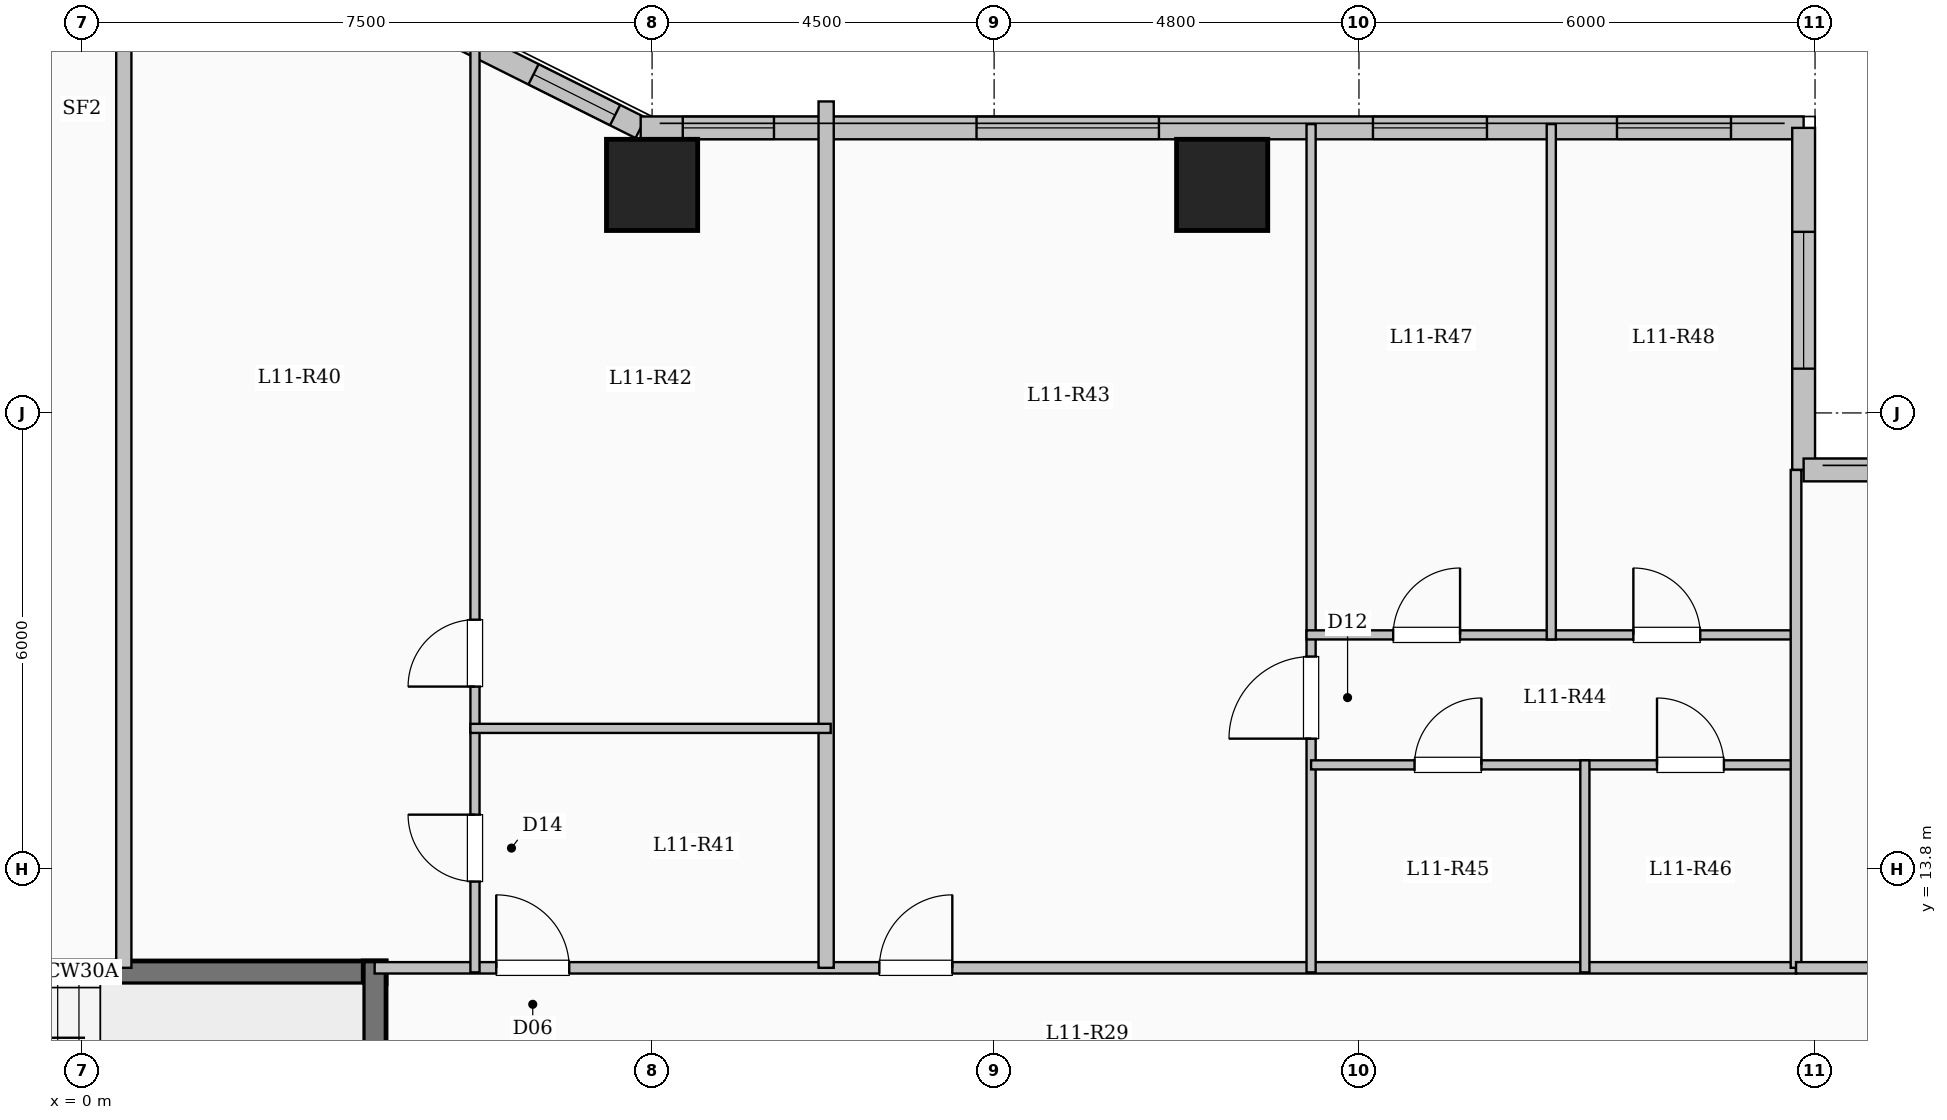
"""IFC4 building model, lengths in metres.
Left out: names, types, materials, properties, quantities, classifications, styles, units other than length and angle.
Written with IfcOpenShell. Run it as: python <this file> out.ifc"""

import sys

from ifc_helpers import new_model, si_unit, direction, frame, frame_2d, origin, origin_2d, place, context, subcontext, project, spatial, rectangle, extrude, element, fill, save


model = new_model("IFC4")
c1 = context("Model", 3, precision=1e-05, world=origin(), true_north=direction((0.0, 1.0)))
c2 = subcontext(c1, "Body", "Model", "MODEL_VIEW")
j1 = project(units=[si_unit("LENGTHUNIT", "METRE"), si_unit("PLANEANGLEUNIT", "RADIAN")], contexts=[c1])
p1 = place(None, origin())
s1 = spatial("IfcSite", under=j1, at=p1, CompositionType="ELEMENT")
p2 = place(p1, origin())
s2 = spatial("IfcBuilding", under=s1, at=p2, CompositionType="ELEMENT")
p3 = place(p2, frame((0.0, 0.0, 44.1)))
s3 = spatial("IfcBuildingStorey", under=s2, at=p3, CompositionType="ELEMENT", Elevation=44.1)
for number, where, z_axis, x_axis in (
    (1, (7.5, 22.8, 0.0), (0.0, 0.0, 1.0), (1.0, 0.0, 0.0)),
    (2, (15.0, 22.8, 0.0), (0.0, 0.0, 1.0), (1.0, 0.0, 0.0)),
):
    element("IfcColumn", number, at=place(p3, frame(where, z_axis=z_axis, x_axis=x_axis)), inside=s3, PredefinedType="COLUMN", context=c2, shape_type="SweptSolid", body=[
        extrude(rectangle(XDim=1.2, YDim=1.2, at=origin_2d()), origin(), (0.0, 0.0, 1.0), 3.35),
    ])
p4 = place(p3, frame((4.35, 25.05, 0.0), z_axis=(0.0, 0.0, 1.0), x_axis=(0.894427191, -0.4472135955, 0.0)))
e3 = element("IfcWall", 3, at=p4, inside=s3, PredefinedType="SOLIDWALL", context=c2, shape_type="SweptSolid", body=[
    extrude(rectangle(XDim=3.354, YDim=0.3, at=frame_2d((1.677, 0.0))), origin(), (0.0, 0.0, 1.0), 3.1),
])
p5 = place(p4, frame((1.778, 0.0, 0.95)))
e4 = element("IfcOpeningElement", 4, at=p5, cuts=e3, PredefinedType="OPENING", context=c2, shape_type="SweptSolid", body=[
    extrude(rectangle(XDim=1.2, YDim=1.5, at=frame_2d((0.6, 0.75))), frame((0.0, 0.16, 0.0), z_axis=(0.0, -1.0, 0.0), x_axis=(1.0, 0.0, 0.0)), (0.0, 0.0, 1.0), 0.32),
])
p6 = place(p3, frame((7.35, 23.55, 0.0), z_axis=(0.0, 0.0, 1.0), x_axis=(1.0, 0.0, 0.0)))
e5 = element("IfcWall", 5, at=p6, inside=s3, PredefinedType="SOLIDWALL", context=c2, shape_type="SweptSolid", body=[
    extrude(rectangle(XDim=15.3, YDim=0.3, at=frame_2d((7.65, 0.0))), origin(), (0.0, 0.0, 1.0), 3.1),
])
p7 = place(p6, frame((0.554, 0.0, 0.95)))
e6 = element("IfcOpeningElement", 6, at=p7, cuts=e5, PredefinedType="OPENING", context=c2, shape_type="SweptSolid", body=[
    extrude(rectangle(XDim=1.2, YDim=1.5, at=frame_2d((0.6, 0.75))), frame((0.0, 0.16, 0.0), z_axis=(0.0, -1.0, 0.0), x_axis=(1.0, 0.0, 0.0)), (0.0, 0.0, 1.0), 0.32),
])
p8 = place(p6, frame((4.418, 0.0, 0.9)))
e7 = element("IfcOpeningElement", 7, at=p8, cuts=e5, PredefinedType="OPENING", context=c2, shape_type="SweptSolid", body=[
    extrude(rectangle(XDim=2.4, YDim=1.8, at=frame_2d((1.2, 0.9))), frame((0.0, 0.16, 0.0), z_axis=(0.0, -1.0, 0.0), x_axis=(1.0, 0.0, 0.0)), (0.0, 0.0, 1.0), 0.32),
])
p9 = place(p6, frame((9.634, 0.0, 0.9)))
e8 = element("IfcOpeningElement", 8, at=p9, cuts=e5, PredefinedType="OPENING", context=c2, shape_type="SweptSolid", body=[
    extrude(rectangle(XDim=1.5, YDim=1.65, at=frame_2d((0.75, 0.825))), frame((0.0, 0.16, 0.0), z_axis=(0.0, -1.0, 0.0), x_axis=(1.0, 0.0, 0.0)), (0.0, 0.0, 1.0), 0.32),
])
p10 = place(p6, frame((12.844, 0.0, 0.9)))
e9 = element("IfcOpeningElement", 9, at=p10, cuts=e5, PredefinedType="OPENING", context=c2, shape_type="SweptSolid", body=[
    extrude(rectangle(XDim=1.5, YDim=1.65, at=frame_2d((0.75, 0.825))), frame((0.0, 0.16, 0.0), z_axis=(0.0, -1.0, 0.0), x_axis=(1.0, 0.0, 0.0)), (0.0, 0.0, 1.0), 0.32),
])
p11 = place(p3, frame((22.65, 23.55, 0.0), z_axis=(0.0, 0.0, 1.0), x_axis=(0.0, -1.0, 0.0)))
e10 = element("IfcWall", 10, at=p11, inside=s3, PredefinedType="SOLIDWALL", context=c2, shape_type="SweptSolid", body=[
    extrude(rectangle(XDim=4.5, YDim=0.3, at=frame_2d((2.25, 0.0))), origin(), (0.0, 0.0, 1.0), 3.1),
])
p12 = place(p11, frame((1.367, 0.0, 0.9)))
e11 = element("IfcOpeningElement", 11, at=p12, cuts=e10, PredefinedType="OPENING", context=c2, shape_type="SweptSolid", body=[
    extrude(rectangle(XDim=1.8, YDim=1.65, at=frame_2d((0.9, 0.825))), frame((0.0, 0.16, 0.0), z_axis=(0.0, -1.0, 0.0), x_axis=(1.0, 0.0, 0.0)), (0.0, 0.0, 1.0), 0.32),
])
p13 = place(p3, frame((22.65, 19.05, 0.0), z_axis=(0.0, 0.0, 1.0), x_axis=(1.0, 0.0, 0.0)))
e12 = element("IfcWall", 12, at=p13, inside=s3, PredefinedType="SOLIDWALL", context=c2, shape_type="SweptSolid", body=[
    extrude(rectangle(XDim=6.0, YDim=0.3, at=frame_2d((3.0, 0.0))), origin(), (0.0, 0.0, 1.0), 3.1),
])
p14 = place(p13, frame((1.975, 0.0, 0.9)))
e13 = element("IfcOpeningElement", 13, at=p14, cuts=e12, PredefinedType="OPENING", context=c2, shape_type="SweptSolid", body=[
    extrude(rectangle(XDim=2.0, YDim=1.7, at=frame_2d((1.0, 0.85))), frame((0.0, 0.16, 0.0), z_axis=(0.0, -1.0, 0.0), x_axis=(1.0, 0.0, 0.0)), (0.0, 0.0, 1.0), 0.32),
])
p15 = place(p3, frame((-4.0, 12.44, 0.0), z_axis=(0.0, 0.0, 1.0), x_axis=(1.0, 0.0, 0.0)))
e14 = element("IfcWall", 14, at=p15, inside=s3, PredefinedType="SHEAR", context=c2, shape_type="SweptSolid", body=[
    extrude(rectangle(XDim=8.0, YDim=0.3, at=frame_2d((4.0, 0.0))), origin(), (0.0, 0.0, 1.0), 3.35),
])
p16 = place(p3, frame((3.85, 9.0, 0.0), z_axis=(0.0, 0.0, 1.0), x_axis=(0.0, 1.0, 0.0)))
e15 = element("IfcWall", 15, at=p16, inside=s3, PredefinedType="SHEAR", context=c2, shape_type="SweptSolid", body=[
    extrude(rectangle(XDim=3.59, YDim=0.3, at=frame_2d((1.795, 0.0))), origin(), (0.0, 0.0, 1.0), 3.35),
])
p17 = place(p3, frame((3.85, 12.5, 0.0), z_axis=(0.0, 0.0, 1.0), x_axis=(1.0, 0.0, 0.0)))
e16 = element("IfcWall", 16, at=p17, inside=s3, PredefinedType="PARTITIONING", context=c2, shape_type="SweptSolid", body=[
    extrude(rectangle(XDim=18.7, YDim=0.15, at=frame_2d((9.35, 0.0))), origin(), (0.0, 0.0, 1.0), 3.1),
])
p18 = place(p17, frame((1.6, 0.0, 0.0)))
e17 = element("IfcOpeningElement", 17, at=p18, cuts=e16, PredefinedType="OPENING", context=c2, shape_type="SweptSolid", body=[
    extrude(rectangle(XDim=0.96, YDim=2.15, at=frame_2d((0.48, 1.075))), frame((0.0, 0.085, 0.0), z_axis=(0.0, -1.0, 0.0), x_axis=(1.0, 0.0, 0.0)), (0.0, 0.0, 1.0), 0.17),
])
p19 = place(p17, frame((6.64, 0.0, 0.0)))
e18 = element("IfcOpeningElement", 18, at=p19, cuts=e16, PredefinedType="OPENING", context=c2, shape_type="SweptSolid", body=[
    extrude(rectangle(XDim=0.96, YDim=2.15, at=frame_2d((0.48, 1.075))), frame((0.0, 0.085, 0.0), z_axis=(0.0, -1.0, 0.0), x_axis=(1.0, 0.0, 0.0)), (0.0, 0.0, 1.0), 0.17),
])
p20 = place(p3, frame((0.55, 12.5, 0.0), z_axis=(0.0, 0.0, 1.0), x_axis=(0.0, 1.0, 0.0)))
e19 = element("IfcWall", 19, at=p20, inside=s3, PredefinedType="SOLIDWALL", context=c2, shape_type="SweptSolid", body=[
    extrude(rectangle(XDim=12.58, YDim=0.2, at=frame_2d((6.29, 0.0))), origin(), (0.0, 0.0, 1.0), 3.1),
])
p21 = place(p3, frame((9.79, 12.5, 0.0), z_axis=(0.0, 0.0, 1.0), x_axis=(0.0, 1.0, 0.0)))
e20 = element("IfcWall", 20, at=p21, inside=s3, PredefinedType="SOLIDWALL", context=c2, shape_type="SweptSolid", body=[
    extrude(rectangle(XDim=11.398, YDim=0.2, at=frame_2d((5.699, 0.0))), origin(), (0.0, 0.0, 1.0), 3.1),
])
p22 = place(p3, frame((5.17, 12.44, 0.0), z_axis=(0.0, 0.0, 1.0), x_axis=(0.0, 1.0, 0.0)))
e21 = element("IfcWall", 21, at=p22, inside=s3, PredefinedType="PARTITIONING", context=c2, shape_type="SweptSolid", body=[
    extrude(rectangle(XDim=3.21, YDim=0.12, at=frame_2d((1.605, 0.0))), origin(), (0.0, 0.0, 1.0), 3.1),
])
p23 = place(p22, frame((1.195, 0.0, 0.0)))
e22 = element("IfcOpeningElement", 22, at=p23, cuts=e21, PredefinedType="OPENING", context=c2, shape_type="SweptSolid", body=[
    extrude(rectangle(XDim=0.88, YDim=2.1, at=frame_2d((0.44, 1.05))), frame((0.0, 0.07, 0.0), z_axis=(0.0, -1.0, 0.0), x_axis=(1.0, 0.0, 0.0)), (0.0, 0.0, 1.0), 0.14),
])
p24 = place(p3, frame((5.17, 15.65, 0.0), z_axis=(0.0, 0.0, 1.0), x_axis=(0.0, 1.0, 0.0)))
e23 = element("IfcWall", 23, at=p24, inside=s3, PredefinedType="PARTITIONING", context=c2, shape_type="SweptSolid", body=[
    extrude(rectangle(XDim=9.388, YDim=0.12, at=frame_2d((4.694, 0.0))), origin(), (0.0, 0.0, 1.0), 3.1),
])
p25 = place(p24, frame((0.55, 0.0, 0.0)))
e24 = element("IfcOpeningElement", 24, at=p25, cuts=e23, PredefinedType="OPENING", context=c2, shape_type="SweptSolid", body=[
    extrude(rectangle(XDim=0.88, YDim=2.1, at=frame_2d((0.44, 1.05))), frame((0.0, 0.07, 0.0), z_axis=(0.0, -1.0, 0.0), x_axis=(1.0, 0.0, 0.0)), (0.0, 0.0, 1.0), 0.14),
])
p26 = place(p3, frame((5.11, 15.65, 0.0), z_axis=(0.0, 0.0, 1.0), x_axis=(1.0, 0.0, 0.0)))
e25 = element("IfcWall", 25, at=p26, inside=s3, PredefinedType="PARTITIONING", context=c2, shape_type="SweptSolid", body=[
    extrude(rectangle(XDim=4.74, YDim=0.12, at=frame_2d((2.37, 0.0))), origin(), (0.0, 0.0, 1.0), 3.1),
])
p27 = place(p3, frame((16.17, 12.44, 0.0), z_axis=(0.0, 0.0, 1.0), x_axis=(0.0, 1.0, 0.0)))
e26 = element("IfcWall", 26, at=p27, inside=s3, PredefinedType="PARTITIONING", context=c2, shape_type="SweptSolid", body=[
    extrude(rectangle(XDim=11.16, YDim=0.12, at=frame_2d((5.58, 0.0))), origin(), (0.0, 0.0, 1.0), 3.1),
])
p28 = place(p27, frame((3.075, 0.0, 0.0)))
e27 = element("IfcOpeningElement", 27, at=p28, cuts=e26, PredefinedType="OPENING", context=c2, shape_type="SweptSolid", body=[
    extrude(rectangle(XDim=1.08, YDim=2.15, at=frame_2d((0.54, 1.075))), frame((0.0, 0.07, 0.0), z_axis=(0.0, -1.0, 0.0), x_axis=(1.0, 0.0, 0.0)), (0.0, 0.0, 1.0), 0.14),
])
p29 = place(p3, frame((16.17, 15.17, 0.0), z_axis=(0.0, 0.0, 1.0), x_axis=(1.0, 0.0, 0.0)))
e28 = element("IfcWall", 28, at=p29, inside=s3, PredefinedType="PARTITIONING", context=c2, shape_type="SweptSolid", body=[
    extrude(rectangle(XDim=3.602, YDim=0.12, at=frame_2d((1.801, 0.0))), origin(), (0.0, 0.0, 1.0), 3.1),
])
p30 = place(p29, frame((1.361, 0.0, 0.0)))
e29 = element("IfcOpeningElement", 29, at=p30, cuts=e28, PredefinedType="OPENING", context=c2, shape_type="SweptSolid", body=[
    extrude(rectangle(XDim=0.88, YDim=2.1, at=frame_2d((0.44, 1.05))), frame((0.0, 0.07, 0.0), z_axis=(0.0, -1.0, 0.0), x_axis=(1.0, 0.0, 0.0)), (0.0, 0.0, 1.0), 0.14),
])
p31 = place(p3, frame((19.772, 15.17, 0.0), z_axis=(0.0, 0.0, 1.0), x_axis=(1.0, 0.0, 0.0)))
e30 = element("IfcWall", 30, at=p31, inside=s3, PredefinedType="PARTITIONING", context=c2, shape_type="SweptSolid", body=[
    extrude(rectangle(XDim=2.778, YDim=0.12, at=frame_2d((1.389, 0.0))), origin(), (0.0, 0.0, 1.0), 3.1),
])
p32 = place(p31, frame((0.949, 0.0, 0.0)))
e31 = element("IfcOpeningElement", 31, at=p32, cuts=e30, PredefinedType="OPENING", context=c2, shape_type="SweptSolid", body=[
    extrude(rectangle(XDim=0.88, YDim=2.1, at=frame_2d((0.44, 1.05))), frame((0.0, 0.07, 0.0), z_axis=(0.0, -1.0, 0.0), x_axis=(1.0, 0.0, 0.0)), (0.0, 0.0, 1.0), 0.14),
])
p33 = place(p3, frame((16.11, 16.88, 0.0), z_axis=(0.0, 0.0, 1.0), x_axis=(1.0, 0.0, 0.0)))
e32 = element("IfcWall", 32, at=p33, inside=s3, PredefinedType="PARTITIONING", context=c2, shape_type="SweptSolid", body=[
    extrude(rectangle(XDim=6.5, YDim=0.12, at=frame_2d((3.25, 0.0))), origin(), (0.0, 0.0, 1.0), 3.1),
])
p34 = place(p33, frame((1.14, 0.0, 0.0)))
e33 = element("IfcOpeningElement", 33, at=p34, cuts=e32, PredefinedType="OPENING", context=c2, shape_type="SweptSolid", body=[
    extrude(rectangle(XDim=0.88, YDim=2.1, at=frame_2d((0.44, 1.05))), frame((0.0, 0.07, 0.0), z_axis=(0.0, -1.0, 0.0), x_axis=(1.0, 0.0, 0.0)), (0.0, 0.0, 1.0), 0.14),
])
p35 = place(p33, frame((4.3, 0.0, 0.0)))
e34 = element("IfcOpeningElement", 34, at=p35, cuts=e32, PredefinedType="OPENING", context=c2, shape_type="SweptSolid", body=[
    extrude(rectangle(XDim=0.88, YDim=2.1, at=frame_2d((0.44, 1.05))), frame((0.0, 0.07, 0.0), z_axis=(0.0, -1.0, 0.0), x_axis=(1.0, 0.0, 0.0)), (0.0, 0.0, 1.0), 0.14),
])
p36 = place(p3, frame((19.772, 12.44, 0.0), z_axis=(0.0, 0.0, 1.0), x_axis=(0.0, 1.0, 0.0)))
e35 = element("IfcWall", 35, at=p36, inside=s3, PredefinedType="PARTITIONING", context=c2, shape_type="SweptSolid", body=[
    extrude(rectangle(XDim=2.79, YDim=0.12, at=frame_2d((1.395, 0.0))), origin(), (0.0, 0.0, 1.0), 3.1),
])
p37 = place(p3, frame((19.33, 16.82, 0.0), z_axis=(0.0, 0.0, 1.0), x_axis=(0.0, 1.0, 0.0)))
e36 = element("IfcWall", 36, at=p37, inside=s3, PredefinedType="PARTITIONING", context=c2, shape_type="SweptSolid", body=[
    extrude(rectangle(XDim=6.78, YDim=0.12, at=frame_2d((3.39, 0.0))), origin(), (0.0, 0.0, 1.0), 3.1),
])
p38 = place(p3, frame((22.55, 12.5, 0.0), z_axis=(0.0, 0.0, 1.0), x_axis=(0.0, 1.0, 0.0)))
e37 = element("IfcWall", 37, at=p38, inside=s3, PredefinedType="PARTITIONING", context=c2, shape_type="SweptSolid", body=[
    extrude(rectangle(XDim=6.55, YDim=0.14, at=frame_2d((3.275, 0.0))), origin(), (0.0, 0.0, 1.0), 3.1),
])
p39 = place(p3, frame((22.55, 12.5, 0.0), z_axis=(0.0, 0.0, 1.0), x_axis=(1.0, 0.0, 0.0)))
e38 = element("IfcWall", 38, at=p39, inside=s3, PredefinedType="PARTITIONING", context=c2, shape_type="SweptSolid", body=[
    extrude(rectangle(XDim=6.13, YDim=0.15, at=frame_2d((3.065, 0.0))), origin(), (0.0, 0.0, 1.0), 3.1),
])
p40 = place(p39, frame((2.59, 0.0, 0.0)))
e39 = element("IfcOpeningElement", 39, at=p40, cuts=e38, PredefinedType="OPENING", context=c2, shape_type="SweptSolid", body=[
    extrude(rectangle(XDim=0.95, YDim=2.15, at=frame_2d((0.475, 1.075))), frame((0.0, 0.085, 0.0), z_axis=(0.0, -1.0, 0.0), x_axis=(1.0, 0.0, 0.0)), (0.0, 0.0, 1.0), 0.17),
])
p41 = place(p5, origin())
e40 = element("IfcWindow", 40, at=p41, inside=s3, PartitioningType="SINGLE_PANEL", PredefinedType="WINDOW", context=c2, shape_type="SweptSolid", body=[
    extrude(rectangle(XDim=1.2, YDim=1.5, at=frame_2d((0.6, 0.75))), frame((0.0, 0.03, 0.0), z_axis=(0.0, -1.0, 0.0), x_axis=(1.0, 0.0, 0.0)), (0.0, 0.0, 1.0), 0.06),
])
fill(e4, e40)
p42 = place(p7, origin())
e41 = element("IfcWindow", 41, at=p42, inside=s3, PartitioningType="SINGLE_PANEL", PredefinedType="WINDOW", context=c2, shape_type="SweptSolid", body=[
    extrude(rectangle(XDim=1.2, YDim=1.5, at=frame_2d((0.6, 0.75))), frame((0.0, 0.03, 0.0), z_axis=(0.0, -1.0, 0.0), x_axis=(1.0, 0.0, 0.0)), (0.0, 0.0, 1.0), 0.06),
])
fill(e6, e41)
p43 = place(p8, origin())
e42 = element("IfcWindow", 42, at=p43, inside=s3, PartitioningType="SINGLE_PANEL", PredefinedType="WINDOW", context=c2, shape_type="SweptSolid", body=[
    extrude(rectangle(XDim=2.4, YDim=1.8, at=frame_2d((1.2, 0.9))), frame((0.0, 0.03, 0.0), z_axis=(0.0, -1.0, 0.0), x_axis=(1.0, 0.0, 0.0)), (0.0, 0.0, 1.0), 0.06),
])
fill(e7, e42)
p44 = place(p9, origin())
e43 = element("IfcWindow", 43, at=p44, inside=s3, PartitioningType="SINGLE_PANEL", PredefinedType="WINDOW", context=c2, shape_type="SweptSolid", body=[
    extrude(rectangle(XDim=1.5, YDim=1.65, at=frame_2d((0.75, 0.825))), frame((0.0, 0.03, 0.0), z_axis=(0.0, -1.0, 0.0), x_axis=(1.0, 0.0, 0.0)), (0.0, 0.0, 1.0), 0.06),
])
fill(e8, e43)
p45 = place(p10, origin())
e44 = element("IfcWindow", 44, at=p45, inside=s3, PartitioningType="SINGLE_PANEL", PredefinedType="WINDOW", context=c2, shape_type="SweptSolid", body=[
    extrude(rectangle(XDim=1.5, YDim=1.65, at=frame_2d((0.75, 0.825))), frame((0.0, 0.03, 0.0), z_axis=(0.0, -1.0, 0.0), x_axis=(1.0, 0.0, 0.0)), (0.0, 0.0, 1.0), 0.06),
])
fill(e9, e44)
p46 = place(p12, origin())
e45 = element("IfcWindow", 45, at=p46, inside=s3, PartitioningType="SINGLE_PANEL", PredefinedType="WINDOW", context=c2, shape_type="SweptSolid", body=[
    extrude(rectangle(XDim=1.8, YDim=1.65, at=frame_2d((0.9, 0.825))), frame((0.0, 0.03, 0.0), z_axis=(0.0, -1.0, 0.0), x_axis=(1.0, 0.0, 0.0)), (0.0, 0.0, 1.0), 0.06),
])
fill(e11, e45)
p47 = place(p18, origin())
e46 = element("IfcDoor", 46, at=p47, inside=s3, OperationType="SINGLE_SWING_LEFT", PredefinedType="DOOR", context=c2, shape_type="SweptSolid", body=[
    extrude(rectangle(XDim=0.96, YDim=2.15, at=frame_2d((0.48, 1.075))), frame((0.0, 0.025, 0.0), z_axis=(0.0, -1.0, 0.0), x_axis=(1.0, 0.0, 0.0)), (0.0, 0.0, 1.0), 0.05),
])
fill(e17, e46)
p48 = place(p23, origin())
e47 = element("IfcDoor", 47, at=p48, inside=s3, OperationType="SINGLE_SWING_RIGHT", PredefinedType="DOOR", context=c2, shape_type="SweptSolid", body=[
    extrude(rectangle(XDim=0.88, YDim=2.1, at=frame_2d((0.44, 1.05))), frame((0.0, 0.025, 0.0), z_axis=(0.0, -1.0, 0.0), x_axis=(1.0, 0.0, 0.0)), (0.0, 0.0, 1.0), 0.05),
])
fill(e22, e47)
p49 = place(p25, origin())
e48 = element("IfcDoor", 48, at=p49, inside=s3, OperationType="SINGLE_SWING_LEFT", PredefinedType="DOOR", context=c2, shape_type="SweptSolid", body=[
    extrude(rectangle(XDim=0.88, YDim=2.1, at=frame_2d((0.44, 1.05))), frame((0.0, 0.025, 0.0), z_axis=(0.0, -1.0, 0.0), x_axis=(1.0, 0.0, 0.0)), (0.0, 0.0, 1.0), 0.05),
])
fill(e24, e48)
p50 = place(p19, origin())
e49 = element("IfcDoor", 49, at=p50, inside=s3, OperationType="SINGLE_SWING_RIGHT", PredefinedType="DOOR", context=c2, shape_type="SweptSolid", body=[
    extrude(rectangle(XDim=0.96, YDim=2.15, at=frame_2d((0.48, 1.075))), frame((0.0, 0.025, 0.0), z_axis=(0.0, -1.0, 0.0), x_axis=(1.0, 0.0, 0.0)), (0.0, 0.0, 1.0), 0.05),
])
fill(e18, e49)
p51 = place(p28, origin())
e50 = element("IfcDoor", 50, at=p51, inside=s3, OperationType="SINGLE_SWING_LEFT", PredefinedType="DOOR", context=c2, shape_type="SweptSolid", body=[
    extrude(rectangle(XDim=1.08, YDim=2.15, at=frame_2d((0.54, 1.075))), frame((0.0, 0.025, 0.0), z_axis=(0.0, -1.0, 0.0), x_axis=(1.0, 0.0, 0.0)), (0.0, 0.0, 1.0), 0.05),
])
fill(e27, e50)
p52 = place(p30, origin())
e51 = element("IfcDoor", 51, at=p52, inside=s3, OperationType="SINGLE_SWING_RIGHT", PredefinedType="DOOR", context=c2, shape_type="SweptSolid", body=[
    extrude(rectangle(XDim=0.88, YDim=2.1, at=frame_2d((0.44, 1.05))), frame((0.0, 0.025, 0.0), z_axis=(0.0, -1.0, 0.0), x_axis=(1.0, 0.0, 0.0)), (0.0, 0.0, 1.0), 0.05),
])
fill(e29, e51)
p53 = place(p32, origin())
e52 = element("IfcDoor", 52, at=p53, inside=s3, OperationType="SINGLE_SWING_LEFT", PredefinedType="DOOR", context=c2, shape_type="SweptSolid", body=[
    extrude(rectangle(XDim=0.88, YDim=2.1, at=frame_2d((0.44, 1.05))), frame((0.0, 0.025, 0.0), z_axis=(0.0, -1.0, 0.0), x_axis=(1.0, 0.0, 0.0)), (0.0, 0.0, 1.0), 0.05),
])
fill(e31, e52)
p54 = place(p34, origin())
e53 = element("IfcDoor", 53, at=p54, inside=s3, OperationType="SINGLE_SWING_RIGHT", PredefinedType="DOOR", context=c2, shape_type="SweptSolid", body=[
    extrude(rectangle(XDim=0.88, YDim=2.1, at=frame_2d((0.44, 1.05))), frame((0.0, 0.025, 0.0), z_axis=(0.0, -1.0, 0.0), x_axis=(1.0, 0.0, 0.0)), (0.0, 0.0, 1.0), 0.05),
])
fill(e33, e53)
p55 = place(p35, origin())
e54 = element("IfcDoor", 54, at=p55, inside=s3, OperationType="SINGLE_SWING_LEFT", PredefinedType="DOOR", context=c2, shape_type="SweptSolid", body=[
    extrude(rectangle(XDim=0.88, YDim=2.1, at=frame_2d((0.44, 1.05))), frame((0.0, 0.025, 0.0), z_axis=(0.0, -1.0, 0.0), x_axis=(1.0, 0.0, 0.0)), (0.0, 0.0, 1.0), 0.05),
])
fill(e34, e54)
save(model, sys.argv[1])
